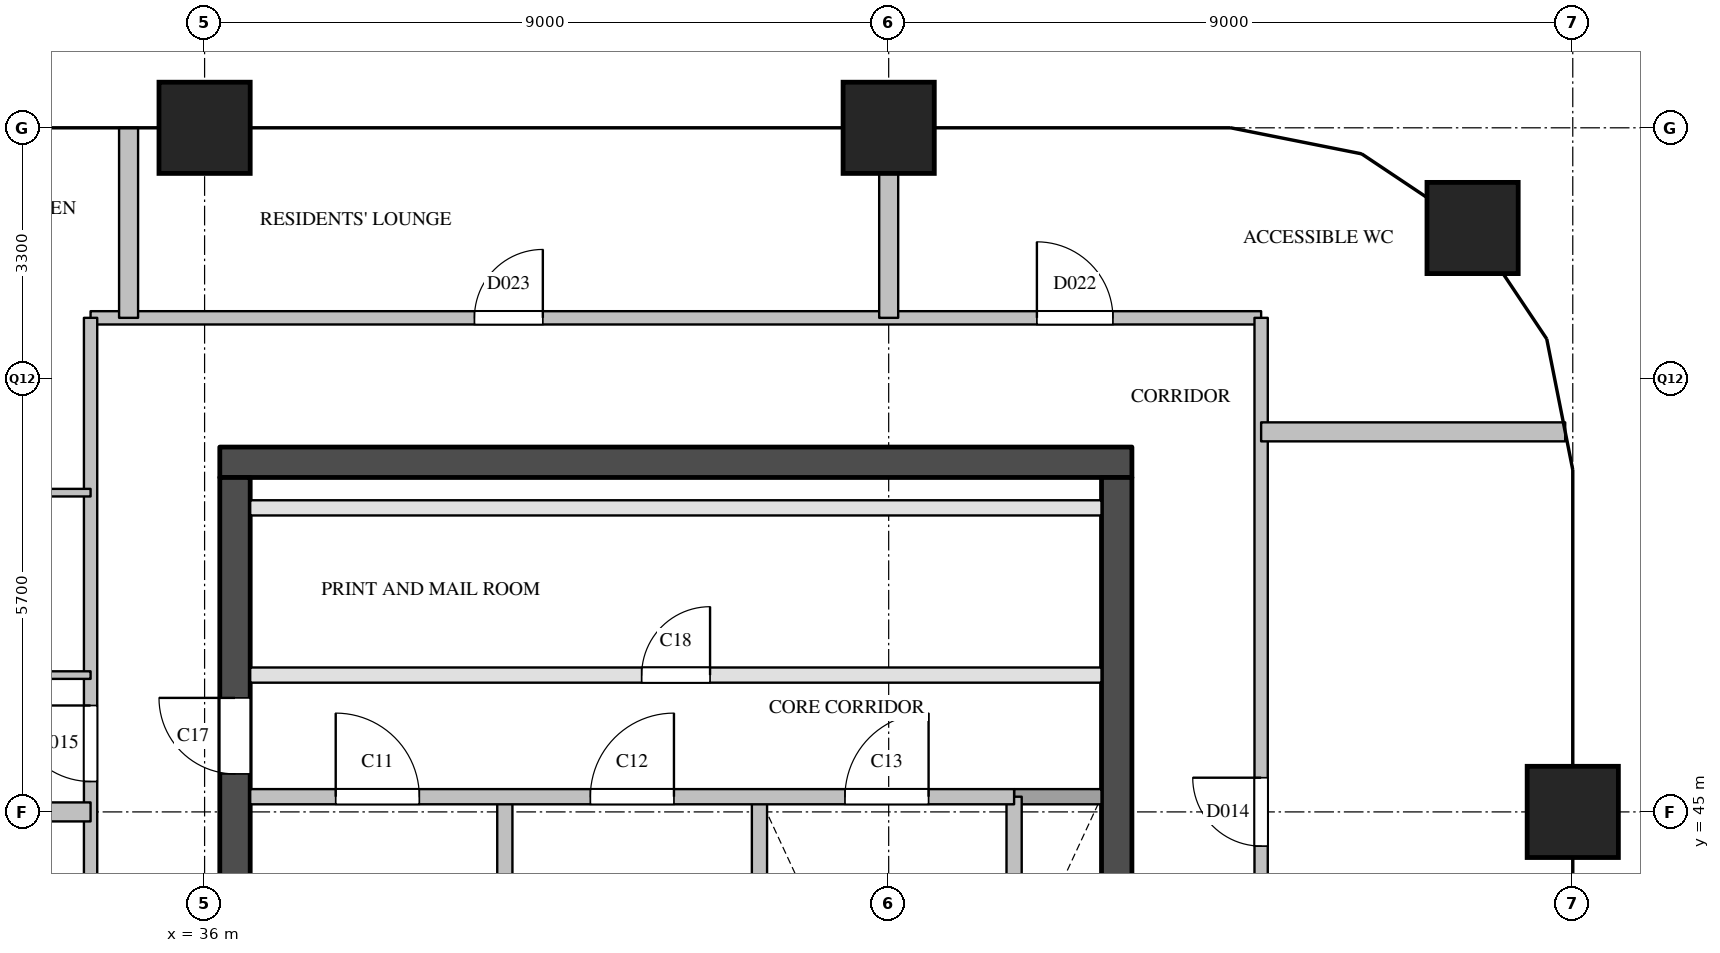
"""IFC4 building model, lengths in metres.
Left out: names, types, materials, properties, quantities, classifications, styles, units other than length and angle.
Written with IfcOpenShell. Run it as: python <this file> out.ifc"""

import sys

from ifc_helpers import new_model, si_unit, direction, frame, frame_2d, origin, origin_2d, place, context, subcontext, project, spatial, rectangle, extrude, element, fill, save


model = new_model("IFC4")
c1 = context("Model", 3, precision=1e-05, world=origin(), true_north=direction((0.0, 1.0)))
c2 = subcontext(c1, "Body", "Model", "MODEL_VIEW")
j1 = project(units=[si_unit("LENGTHUNIT", "METRE"), si_unit("PLANEANGLEUNIT", "RADIAN")], contexts=[c1])
p1 = place(None, origin())
s1 = spatial("IfcSite", under=j1, at=p1, CompositionType="ELEMENT")
p2 = place(p1, origin())
s2 = spatial("IfcBuilding", under=s1, at=p2, CompositionType="ELEMENT")
p3 = place(p2, frame((0.0, 0.0, 234.5)))
s3 = spatial("IfcBuildingStorey", under=s2, at=p3, CompositionType="ELEMENT", Elevation=234.5)
for number, where, z_axis, x_axis in (
    (1, (36.0, 54.0, 0.0), (0.0, 0.0, 1.0), (1.0, 0.0, 0.0)),
    (2, (45.0, 54.0, 0.0), (0.0, 0.0, 1.0), (1.0, 0.0, 0.0)),
    (3, (54.0, 45.0, 0.0), (0.0, 0.0, 1.0), (1.0, 0.0, 0.0)),
    (4, (52.682, 52.682, 0.0), (0.0, 0.0, 1.0), (1.0, 0.0, 0.0)),
):
    element("IfcColumn", number, at=place(p3, frame(where, z_axis=z_axis, x_axis=x_axis)), inside=s3, PredefinedType="COLUMN", context=c2, shape_type="SweptSolid", body=[
        extrude(rectangle(XDim=1.2, YDim=1.2, at=origin_2d()), origin(), (0.0, 0.0, 1.0), 3.9),
    ])
p4 = place(p3, frame((36.2, 49.6, 0.0), z_axis=(0.0, 0.0, 1.0), x_axis=(1.0, 0.0, 0.0)))
e5 = element("IfcWall", 5, at=p4, inside=s3, PredefinedType="SHEAR", context=c2, shape_type="SweptSolid", body=[
    extrude(rectangle(XDim=12.0, YDim=0.4, at=frame_2d((6.0, 0.0))), origin(), (0.0, 0.0, 1.0), 3.6),
])
p5 = place(p3, frame((36.4, 29.1, 0.0), z_axis=(0.0, 0.0, 1.0), x_axis=(0.0, 1.0, 0.0)))
e6 = element("IfcWall", 6, at=p5, inside=s3, PredefinedType="SHEAR", context=c2, shape_type="SweptSolid", body=[
    extrude(rectangle(XDim=20.3, YDim=0.4, at=frame_2d((10.15, 0.0))), origin(), (0.0, 0.0, 1.0), 3.6),
])
p6 = place(p5, frame((3.6, 0.0, 0.0)))
e7 = element("IfcOpeningElement", 7, at=p6, cuts=e6, PredefinedType="OPENING", context=c2, shape_type="SweptSolid", body=[
    extrude(rectangle(XDim=1.8, YDim=2.1, at=frame_2d((0.9, 1.05))), frame((0.0, 0.21, 0.0), z_axis=(0.0, -1.0, 0.0), x_axis=(1.0, 0.0, 0.0)), (0.0, 0.0, 1.0), 0.42),
])
p7 = place(p5, frame((16.4, 0.0, 0.0)))
e8 = element("IfcOpeningElement", 8, at=p7, cuts=e6, PredefinedType="OPENING", context=c2, shape_type="SweptSolid", body=[
    extrude(rectangle(XDim=1.0, YDim=2.1, at=frame_2d((0.5, 1.05))), frame((0.0, 0.21, 0.0), z_axis=(0.0, -1.0, 0.0), x_axis=(1.0, 0.0, 0.0)), (0.0, 0.0, 1.0), 0.42),
])
p8 = place(p3, frame((48.0, 29.1, 0.0), z_axis=(0.0, 0.0, 1.0), x_axis=(0.0, 1.0, 0.0)))
e9 = element("IfcWall", 9, at=p8, inside=s3, PredefinedType="SHEAR", context=c2, shape_type="SweptSolid", body=[
    extrude(rectangle(XDim=20.3, YDim=0.4, at=frame_2d((10.15, 0.0))), origin(), (0.0, 0.0, 1.0), 3.6),
])
p9 = place(p8, frame((12.5, 0.0, 0.0)))
e10 = element("IfcOpeningElement", 10, at=p9, cuts=e9, PredefinedType="OPENING", context=c2, shape_type="SweptSolid", body=[
    extrude(rectangle(XDim=0.7, YDim=2.1, at=frame_2d((0.35, 1.05))), frame((0.0, 0.21, 0.0), z_axis=(0.0, -1.0, 0.0), x_axis=(1.0, 0.0, 0.0)), (0.0, 0.0, 1.0), 0.42),
])
p10 = place(p8, frame((3.9, 0.0, 0.0)))
e11 = element("IfcOpeningElement", 11, at=p10, cuts=e9, PredefinedType="OPENING", context=c2, shape_type="SweptSolid", body=[
    extrude(rectangle(XDim=1.8, YDim=2.1, at=frame_2d((0.9, 1.05))), frame((0.0, 0.21, 0.0), z_axis=(0.0, -1.0, 0.0), x_axis=(1.0, 0.0, 0.0)), (0.0, 0.0, 1.0), 0.42),
])
for number, where, z_axis, x_axis in (
    (12, (39.95, 40.78, 0.0), (0.0, 0.0, 1.0), (0.0, 1.0, 0.0)),
    (13, (43.3, 40.78, 0.0), (0.0, 0.0, 1.0), (0.0, 1.0, 0.0)),
    (14, (46.65, 40.78, 0.0), (0.0, 0.0, 1.0), (0.0, 1.0, 0.0)),
):
    element("IfcWall", number, at=place(p3, frame(where, z_axis=z_axis, x_axis=x_axis)), inside=s3, PredefinedType="SOLIDWALL", context=c2, shape_type="SweptSolid", body=[
        extrude(rectangle(XDim=4.42, YDim=0.2, at=frame_2d((2.21, 0.0))), origin(), (0.0, 0.0, 1.0), 3.6),
    ])
p11 = place(p3, frame((46.65, 45.2, 0.0), z_axis=(0.0, 0.0, 1.0), x_axis=(1.0, 0.0, 0.0)))
e15 = element("IfcWall", 15, at=p11, inside=s3, PredefinedType="SOLIDWALL", context=c2, shape_type="SweptSolid", body=[
    extrude(rectangle(XDim=1.15, YDim=0.2, at=frame_2d((0.575, 0.0))), origin(), (0.0, 0.0, 1.0), 3.6),
])
p12 = place(p3, frame((36.6, 45.2, 0.0), z_axis=(0.0, 0.0, 1.0), x_axis=(1.0, 0.0, 0.0)))
e16 = element("IfcWall", 16, at=p12, inside=s3, PredefinedType="SOLIDWALL", context=c2, shape_type="SweptSolid", body=[
    extrude(rectangle(XDim=10.05, YDim=0.2, at=frame_2d((5.025, 0.0))), origin(), (0.0, 0.0, 1.0), 3.6),
])
p13 = place(p12, frame((1.125, 0.0, 0.0)))
e17 = element("IfcOpeningElement", 17, at=p13, cuts=e16, PredefinedType="OPENING", context=c2, shape_type="SweptSolid", body=[
    extrude(rectangle(XDim=1.1, YDim=2.1, at=frame_2d((0.55, 1.05))), frame((0.0, 0.11, 0.0), z_axis=(0.0, -1.0, 0.0), x_axis=(1.0, 0.0, 0.0)), (0.0, 0.0, 1.0), 0.22),
])
p14 = place(p12, frame((4.475, 0.0, 0.0)))
e18 = element("IfcOpeningElement", 18, at=p14, cuts=e16, PredefinedType="OPENING", context=c2, shape_type="SweptSolid", body=[
    extrude(rectangle(XDim=1.1, YDim=2.1, at=frame_2d((0.55, 1.05))), frame((0.0, 0.11, 0.0), z_axis=(0.0, -1.0, 0.0), x_axis=(1.0, 0.0, 0.0)), (0.0, 0.0, 1.0), 0.22),
])
p15 = place(p12, frame((7.825, 0.0, 0.0)))
e19 = element("IfcOpeningElement", 19, at=p15, cuts=e16, PredefinedType="OPENING", context=c2, shape_type="SweptSolid", body=[
    extrude(rectangle(XDim=1.1, YDim=2.1, at=frame_2d((0.55, 1.05))), frame((0.0, 0.11, 0.0), z_axis=(0.0, -1.0, 0.0), x_axis=(1.0, 0.0, 0.0)), (0.0, 0.0, 1.0), 0.22),
])
p16 = place(p3, frame((36.6, 46.8, 0.0), z_axis=(0.0, 0.0, 1.0), x_axis=(1.0, 0.0, 0.0)))
e20 = element("IfcWall", 20, at=p16, inside=s3, PredefinedType="PARTITIONING", context=c2, shape_type="SweptSolid", body=[
    extrude(rectangle(XDim=11.2, YDim=0.2, at=frame_2d((5.6, 0.0))), origin(), (0.0, 0.0, 1.0), 3.6),
])
p17 = place(p16, frame((5.15, 0.0, 0.0)))
e21 = element("IfcOpeningElement", 21, at=p17, cuts=e20, PredefinedType="OPENING", context=c2, shape_type="SweptSolid", body=[
    extrude(rectangle(XDim=0.9, YDim=2.1, at=frame_2d((0.45, 1.05))), frame((0.0, 0.11, 0.0), z_axis=(0.0, -1.0, 0.0), x_axis=(1.0, 0.0, 0.0)), (0.0, 0.0, 1.0), 0.22),
])
p18 = place(p3, frame((36.6, 49.0, 0.0), z_axis=(0.0, 0.0, 1.0), x_axis=(1.0, 0.0, 0.0)))
e22 = element("IfcWall", 22, at=p18, inside=s3, PredefinedType="PARTITIONING", context=c2, shape_type="SweptSolid", body=[
    extrude(rectangle(XDim=11.2, YDim=0.2, at=frame_2d((5.6, 0.0))), origin(), (0.0, 0.0, 1.0), 3.6),
])
p19 = place(p3, frame((34.5, 51.5, 0.0), z_axis=(0.0, 0.0, 1.0), x_axis=(1.0, 0.0, 0.0)))
e23 = element("IfcWall", 23, at=p19, inside=s3, PredefinedType="PARTITIONING", context=c2, shape_type="SweptSolid", body=[
    extrude(rectangle(XDim=15.4, YDim=0.175, at=frame_2d((7.7, 0.0))), origin(), (0.0, 0.0, 1.0), 3.6),
])
p20 = place(p19, frame((12.45, 0.0, 0.0)))
e24 = element("IfcOpeningElement", 24, at=p20, cuts=e23, PredefinedType="OPENING", context=c2, shape_type="SweptSolid", body=[
    extrude(rectangle(XDim=1.0, YDim=2.1, at=frame_2d((0.5, 1.05))), frame((0.0, 0.097, 0.0), z_axis=(0.0, -1.0, 0.0), x_axis=(1.0, 0.0, 0.0)), (0.0, 0.0, 1.0), 0.195),
])
p21 = place(p19, frame((5.05, 0.0, 0.0)))
e25 = element("IfcOpeningElement", 25, at=p21, cuts=e23, PredefinedType="OPENING", context=c2, shape_type="SweptSolid", body=[
    extrude(rectangle(XDim=0.9, YDim=2.1, at=frame_2d((0.45, 1.05))), frame((0.0, 0.097, 0.0), z_axis=(0.0, -1.0, 0.0), x_axis=(1.0, 0.0, 0.0)), (0.0, 0.0, 1.0), 0.195),
])
p22 = place(p3, frame((34.5, 28.5, 0.0), z_axis=(0.0, 0.0, 1.0), x_axis=(0.0, 1.0, 0.0)))
e26 = element("IfcWall", 26, at=p22, inside=s3, PredefinedType="PARTITIONING", context=c2, shape_type="SweptSolid", body=[
    extrude(rectangle(XDim=23.0, YDim=0.175, at=frame_2d((11.5, 0.0))), origin(), (0.0, 0.0, 1.0), 3.6),
])
p23 = place(p22, frame((5.1, 0.0, 0.0)))
e27 = element("IfcOpeningElement", 27, at=p23, cuts=e26, PredefinedType="OPENING", context=c2, shape_type="SweptSolid", body=[
    extrude(rectangle(XDim=1.0, YDim=2.1, at=frame_2d((0.5, 1.05))), frame((0.0, 0.097, 0.0), z_axis=(0.0, -1.0, 0.0), x_axis=(1.0, 0.0, 0.0)), (0.0, 0.0, 1.0), 0.195),
])
p24 = place(p22, frame((6.9, 0.0, 0.0)))
e28 = element("IfcOpeningElement", 28, at=p24, cuts=e26, PredefinedType="OPENING", context=c2, shape_type="SweptSolid", body=[
    extrude(rectangle(XDim=1.0, YDim=2.1, at=frame_2d((0.5, 1.05))), frame((0.0, 0.097, 0.0), z_axis=(0.0, -1.0, 0.0), x_axis=(1.0, 0.0, 0.0)), (0.0, 0.0, 1.0), 0.195),
])
p25 = place(p22, frame((16.9, 0.0, 0.0)))
e29 = element("IfcOpeningElement", 29, at=p25, cuts=e26, PredefinedType="OPENING", context=c2, shape_type="SweptSolid", body=[
    extrude(rectangle(XDim=1.0, YDim=2.1, at=frame_2d((0.5, 1.05))), frame((0.0, 0.097, 0.0), z_axis=(0.0, -1.0, 0.0), x_axis=(1.0, 0.0, 0.0)), (0.0, 0.0, 1.0), 0.195),
])
p26 = place(p3, frame((49.9, 28.5, 0.0), z_axis=(0.0, 0.0, 1.0), x_axis=(0.0, 1.0, 0.0)))
e30 = element("IfcWall", 30, at=p26, inside=s3, PredefinedType="PARTITIONING", context=c2, shape_type="SweptSolid", body=[
    extrude(rectangle(XDim=23.0, YDim=0.175, at=frame_2d((11.5, 0.0))), origin(), (0.0, 0.0, 1.0), 3.6),
])
p27 = place(p26, frame((5.3, 0.0, 0.0)))
e31 = element("IfcOpeningElement", 31, at=p27, cuts=e30, PredefinedType="OPENING", context=c2, shape_type="SweptSolid", body=[
    extrude(rectangle(XDim=0.9, YDim=2.1, at=frame_2d((0.45, 1.05))), frame((0.0, 0.097, 0.0), z_axis=(0.0, -1.0, 0.0), x_axis=(1.0, 0.0, 0.0)), (0.0, 0.0, 1.0), 0.195),
])
p28 = place(p26, frame((16.05, 0.0, 0.0)))
e32 = element("IfcOpeningElement", 32, at=p28, cuts=e30, PredefinedType="OPENING", context=c2, shape_type="SweptSolid", body=[
    extrude(rectangle(XDim=0.9, YDim=2.1, at=frame_2d((0.45, 1.05))), frame((0.0, 0.097, 0.0), z_axis=(0.0, -1.0, 0.0), x_axis=(1.0, 0.0, 0.0)), (0.0, 0.0, 1.0), 0.195),
])
p29 = place(p3, frame((18.0, 45.0, 0.0), z_axis=(0.0, 0.0, 1.0), x_axis=(1.0, 0.0, 0.0)))
e33 = element("IfcWall", 33, at=p29, inside=s3, PredefinedType="PARTITIONING", context=c2, shape_type="SweptSolid", body=[
    extrude(rectangle(XDim=16.5, YDim=0.25, at=frame_2d((8.25, 0.0))), origin(), (0.0, 0.0, 1.0), 3.6),
])
p30 = place(p3, frame((49.9, 50.0, 0.0), z_axis=(0.0, 0.0, 1.0), x_axis=(1.0, 0.0, 0.0)))
e34 = element("IfcWall", 34, at=p30, inside=s3, PredefinedType="PARTITIONING", context=c2, shape_type="SweptSolid", body=[
    extrude(rectangle(XDim=4.0, YDim=0.25, at=frame_2d((2.0, 0.0))), origin(), (0.0, 0.0, 1.0), 2.6),
])
p31 = place(p3, frame((35.0, 51.5, 0.0), z_axis=(0.0, 0.0, 1.0), x_axis=(0.0, 1.0, 0.0)))
e35 = element("IfcWall", 35, at=p31, inside=s3, PredefinedType="PARTITIONING", context=c2, shape_type="SweptSolid", body=[
    extrude(rectangle(XDim=2.5, YDim=0.25, at=frame_2d((1.25, 0.0))), origin(), (0.0, 0.0, 1.0), 2.6),
])
p32 = place(p3, frame((45.0, 51.5, 0.0), z_axis=(0.0, 0.0, 1.0), x_axis=(0.0, 1.0, 0.0)))
e36 = element("IfcWall", 36, at=p32, inside=s3, PredefinedType="PARTITIONING", context=c2, shape_type="SweptSolid", body=[
    extrude(rectangle(XDim=2.5, YDim=0.25, at=frame_2d((1.25, 0.0))), origin(), (0.0, 0.0, 1.0), 3.6),
])
p33 = place(p3, frame((32.6, 46.8, 0.0), z_axis=(0.0, 0.0, 1.0), x_axis=(1.0, 0.0, 0.0)))
e37 = element("IfcWall", 37, at=p33, inside=s3, PredefinedType="PARTITIONING", context=c2, shape_type="SweptSolid", body=[
    extrude(rectangle(XDim=1.9, YDim=0.1, at=frame_2d((0.95, 0.0))), origin(), (0.0, 0.0, 1.0), 3.6),
])
p34 = place(p33, frame((0.55, 0.0, 0.0)))
e38 = element("IfcOpeningElement", 38, at=p34, cuts=e37, PredefinedType="OPENING", context=c2, shape_type="SweptSolid", body=[
    extrude(rectangle(XDim=0.8, YDim=2.1, at=frame_2d((0.4, 1.05))), frame((0.0, 0.06, 0.0), z_axis=(0.0, -1.0, 0.0), x_axis=(1.0, 0.0, 0.0)), (0.0, 0.0, 1.0), 0.12),
])
p35 = place(p3, frame((32.6, 49.2, 0.0), z_axis=(0.0, 0.0, 1.0), x_axis=(1.0, 0.0, 0.0)))
e39 = element("IfcWall", 39, at=p35, inside=s3, PredefinedType="PARTITIONING", context=c2, shape_type="SweptSolid", body=[
    extrude(rectangle(XDim=1.9, YDim=0.1, at=frame_2d((0.95, 0.0))), origin(), (0.0, 0.0, 1.0), 3.6),
])
p36 = place(p13, origin())
e40 = element("IfcDoor", 40, at=p36, inside=s3, OperationType="SINGLE_SWING_LEFT", PredefinedType="DOOR", context=c2, shape_type="SweptSolid", body=[
    extrude(rectangle(XDim=1.1, YDim=2.1, at=frame_2d((0.55, 1.05))), frame((0.0, 0.025, 0.0), z_axis=(0.0, -1.0, 0.0), x_axis=(1.0, 0.0, 0.0)), (0.0, 0.0, 1.0), 0.05),
])
fill(e17, e40)
p37 = place(p14, origin())
e41 = element("IfcDoor", 41, at=p37, inside=s3, OperationType="SINGLE_SWING_RIGHT", PredefinedType="DOOR", context=c2, shape_type="SweptSolid", body=[
    extrude(rectangle(XDim=1.1, YDim=2.1, at=frame_2d((0.55, 1.05))), frame((0.0, 0.025, 0.0), z_axis=(0.0, -1.0, 0.0), x_axis=(1.0, 0.0, 0.0)), (0.0, 0.0, 1.0), 0.05),
])
fill(e18, e41)
p38 = place(p15, origin())
e42 = element("IfcDoor", 42, at=p38, inside=s3, OperationType="SINGLE_SWING_RIGHT", PredefinedType="DOOR", context=c2, shape_type="SweptSolid", body=[
    extrude(rectangle(XDim=1.1, YDim=2.1, at=frame_2d((0.55, 1.05))), frame((0.0, 0.025, 0.0), z_axis=(0.0, -1.0, 0.0), x_axis=(1.0, 0.0, 0.0)), (0.0, 0.0, 1.0), 0.05),
])
fill(e19, e42)
p39 = place(p7, origin())
e43 = element("IfcDoor", 43, at=p39, inside=s3, OperationType="SINGLE_SWING_RIGHT", PredefinedType="DOOR", context=c2, shape_type="SweptSolid", body=[
    extrude(rectangle(XDim=1.0, YDim=2.1, at=frame_2d((0.5, 1.05))), frame((0.0, 0.025, 0.0), z_axis=(0.0, -1.0, 0.0), x_axis=(1.0, 0.0, 0.0)), (0.0, 0.0, 1.0), 0.05),
])
fill(e8, e43)
p40 = place(p17, origin())
e44 = element("IfcDoor", 44, at=p40, inside=s3, OperationType="SINGLE_SWING_RIGHT", PredefinedType="DOOR", context=c2, shape_type="SweptSolid", body=[
    extrude(rectangle(XDim=0.9, YDim=2.1, at=frame_2d((0.45, 1.05))), frame((0.0, 0.025, 0.0), z_axis=(0.0, -1.0, 0.0), x_axis=(1.0, 0.0, 0.0)), (0.0, 0.0, 1.0), 0.05),
])
fill(e21, e44)
p41 = place(p28, origin())
e45 = element("IfcDoor", 45, at=p41, inside=s3, OperationType="SINGLE_SWING_RIGHT", PredefinedType="DOOR", context=c2, shape_type="SweptSolid", body=[
    extrude(rectangle(XDim=0.9, YDim=2.1, at=frame_2d((0.45, 1.05))), frame((0.0, 0.025, 0.0), z_axis=(0.0, -1.0, 0.0), x_axis=(1.0, 0.0, 0.0)), (0.0, 0.0, 1.0), 0.05),
])
fill(e32, e45)
p42 = place(p25, origin())
e46 = element("IfcDoor", 46, at=p42, inside=s3, OperationType="SINGLE_SWING_RIGHT", PredefinedType="DOOR", context=c2, shape_type="SweptSolid", body=[
    extrude(rectangle(XDim=1.0, YDim=2.1, at=frame_2d((0.5, 1.05))), frame((0.0, 0.025, 0.0), z_axis=(0.0, -1.0, 0.0), x_axis=(1.0, 0.0, 0.0)), (0.0, 0.0, 1.0), 0.05),
])
fill(e29, e46)
p43 = place(p20, origin())
e47 = element("IfcDoor", 47, at=p43, inside=s3, OperationType="SINGLE_SWING_LEFT", PredefinedType="DOOR", context=c2, shape_type="SweptSolid", body=[
    extrude(rectangle(XDim=1.0, YDim=2.1, at=frame_2d((0.5, 1.05))), frame((0.0, 0.025, 0.0), z_axis=(0.0, -1.0, 0.0), x_axis=(1.0, 0.0, 0.0)), (0.0, 0.0, 1.0), 0.05),
])
fill(e24, e47)
p44 = place(p21, origin())
e48 = element("IfcDoor", 48, at=p44, inside=s3, OperationType="SINGLE_SWING_RIGHT", PredefinedType="DOOR", context=c2, shape_type="SweptSolid", body=[
    extrude(rectangle(XDim=0.9, YDim=2.1, at=frame_2d((0.45, 1.05))), frame((0.0, 0.025, 0.0), z_axis=(0.0, -1.0, 0.0), x_axis=(1.0, 0.0, 0.0)), (0.0, 0.0, 1.0), 0.05),
])
fill(e25, e48)
save(model, sys.argv[1])
